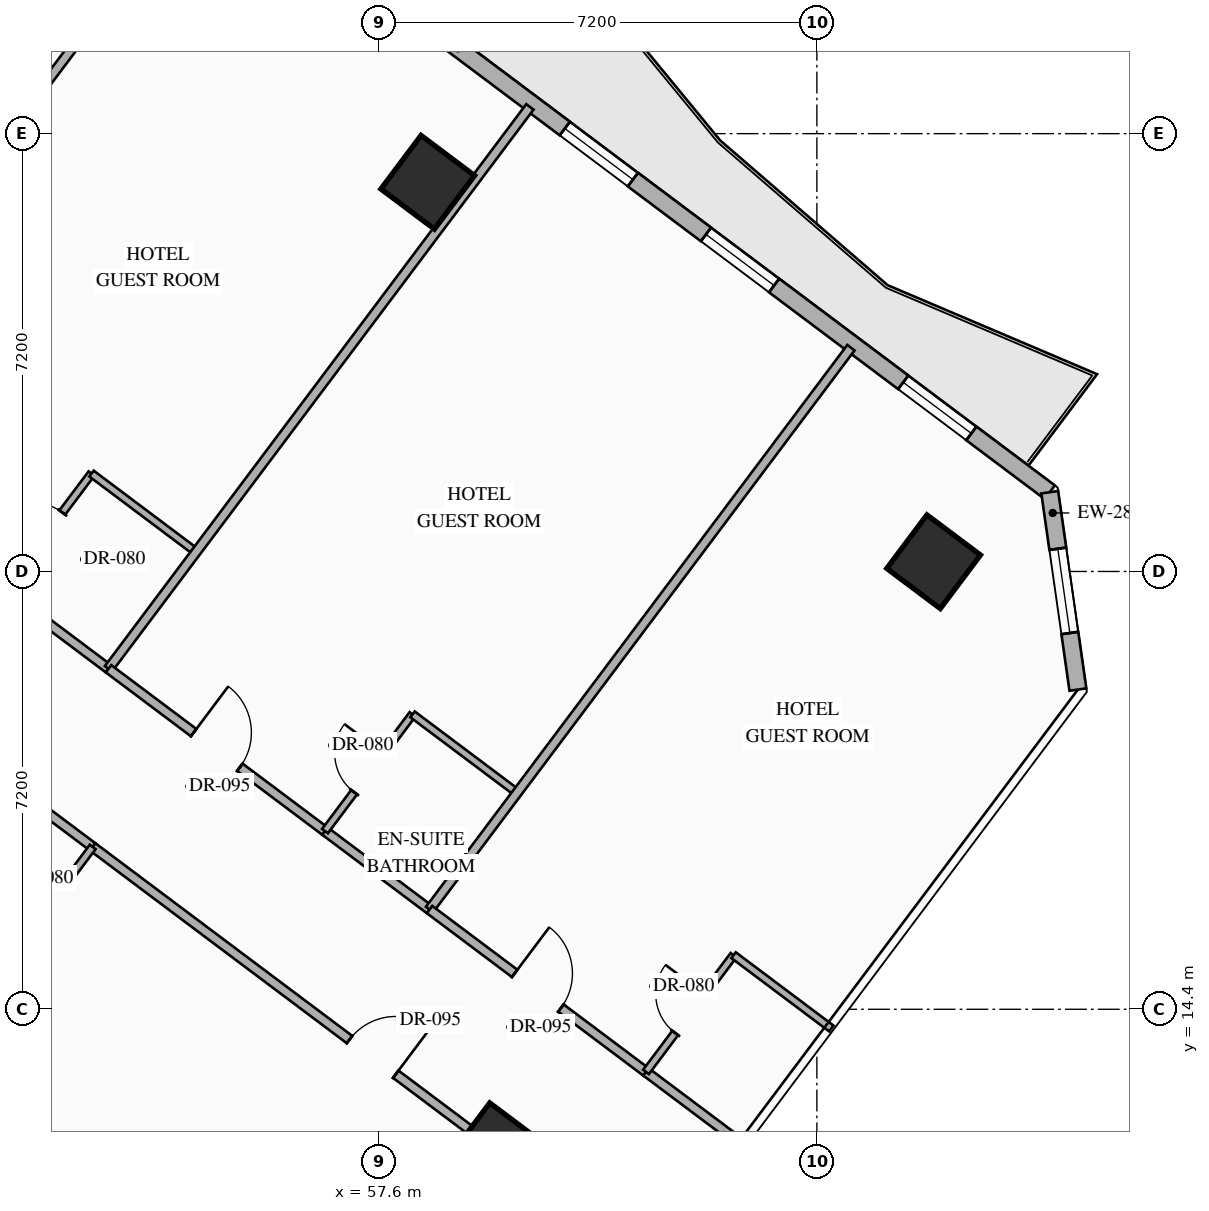
"""IFC4 building model, lengths in metres.
Left out: names, types, materials, properties, quantities, classifications, styles, units other than length and angle.
Written with IfcOpenShell. Run it as: python <this file> out.ifc"""

import sys

from ifc_helpers import new_model, si_unit, direction, frame, frame_2d, origin, origin_2d, place, context, subcontext, project, spatial, rectangle, hollow_rectangle, extrude, element, fill, save


model = new_model("IFC4")
c1 = context("Model", 3, precision=1e-05, world=origin(), true_north=direction((0.0, 1.0)))
c2 = subcontext(c1, "Body", "Model", "MODEL_VIEW")
j1 = project(units=[si_unit("LENGTHUNIT", "METRE"), si_unit("PLANEANGLEUNIT", "RADIAN")], contexts=[c1])
p1 = place(None, origin())
s1 = spatial("IfcSite", under=j1, at=p1, CompositionType="ELEMENT")
p2 = place(p1, origin())
s2 = spatial("IfcBuilding", under=s1, at=p2, CompositionType="ELEMENT")
p3 = place(p2, frame((0.0, 0.0, 53.35)))
s3 = spatial("IfcBuildingStorey", under=s2, at=p3, CompositionType="ELEMENT", Elevation=53.35)
for number, where, z_axis, x_axis in (
    (1, (58.4, 28.0, 0.0), (0.0, 0.0, 1.0), (0.8, -0.6, 0.0)),
    (2, (66.72, 21.76, 0.0), (0.0, 0.0, 1.0), (0.8, -0.6, 0.0)),
):
    element("IfcColumn", number, at=place(p3, frame(where, z_axis=z_axis, x_axis=x_axis)), inside=s3, PredefinedType="COLUMN", context=c2, shape_type="SweptSolid", body=[
        extrude(hollow_rectangle(XDim=1.1, YDim=1.1, WallThickness=0.04, at=origin_2d()), origin(), (0.0, 0.0, 1.0), 3.35),
    ])
p4 = place(p3, frame((59.52, 12.16, 0.0), z_axis=(0.0, 0.0, 1.0), x_axis=(0.799999996291, -0.600000004945, 0.0)))
e3 = element("IfcColumn", 3, at=p4, inside=s3, PredefinedType="COLUMN", context=c2, shape_type="SweptSolid", body=[
    extrude(hollow_rectangle(XDim=1.0, YDim=1.0, WallThickness=0.038, at=origin_2d()), origin(), (0.0, 0.0, 1.0), 3.35),
])
p5 = place(p3, frame((44.86, 40.73, 0.0), z_axis=(0.0, 0.0, 1.0), x_axis=(0.800006902154, -0.599990797017, 0.0)))
e4 = element("IfcWall", 4, at=p5, inside=s3, PredefinedType="STANDARD", context=c2, shape_type="SweptSolid", body=[
    extrude(rectangle(XDim=29.712, YDim=0.28, at=frame_2d((14.856, 0.0))), origin(), (0.0, 0.0, 1.0), 3.13),
])
p6 = place(p5, frame((14.249, 0.0, 0.0)))
e5 = element("IfcOpeningElement", 5, at=p6, cuts=e4, PredefinedType="OPENING", context=c2, shape_type="SweptSolid", body=[
    extrude(rectangle(XDim=1.1, YDim=2.2, at=frame_2d((0.55, 1.1))), frame((0.0, 0.15, 0.0), z_axis=(0.0, -1.0, 0.0), x_axis=(1.0, 0.0, 0.0)), (0.0, 0.0, 1.0), 0.3),
])
p7 = place(p5, frame((1.612, 0.0, 0.85)))
e6 = element("IfcOpeningElement", 6, at=p7, cuts=e4, PredefinedType="OPENING", context=c2, shape_type="SweptSolid", body=[
    extrude(rectangle(XDim=1.4, YDim=1.8, at=frame_2d((0.7, 0.9))), frame((0.0, 0.15, 0.0), z_axis=(0.0, -1.0, 0.0), x_axis=(1.0, 0.0, 0.0)), (0.0, 0.0, 1.0), 0.3),
])
p8 = place(p5, frame((5.667, 0.0, 0.85)))
e7 = element("IfcOpeningElement", 7, at=p8, cuts=e4, PredefinedType="OPENING", context=c2, shape_type="SweptSolid", body=[
    extrude(rectangle(XDim=1.4, YDim=1.8, at=frame_2d((0.7, 0.9))), frame((0.0, 0.15, 0.0), z_axis=(0.0, -1.0, 0.0), x_axis=(1.0, 0.0, 0.0)), (0.0, 0.0, 1.0), 0.3),
])
p9 = place(p5, frame((9.912, 0.0, 0.85)))
e8 = element("IfcOpeningElement", 8, at=p9, cuts=e4, PredefinedType="OPENING", context=c2, shape_type="SweptSolid", body=[
    extrude(rectangle(XDim=1.4, YDim=1.8, at=frame_2d((0.7, 0.9))), frame((0.0, 0.15, 0.0), z_axis=(0.0, -1.0, 0.0), x_axis=(1.0, 0.0, 0.0)), (0.0, 0.0, 1.0), 0.3),
])
p10 = place(p5, frame((19.743, 0.0, 0.85)))
e9 = element("IfcOpeningElement", 9, at=p10, cuts=e4, PredefinedType="OPENING", context=c2, shape_type="SweptSolid", body=[
    extrude(rectangle(XDim=1.4, YDim=1.8, at=frame_2d((0.7, 0.9))), frame((0.0, 0.15, 0.0), z_axis=(0.0, -1.0, 0.0), x_axis=(1.0, 0.0, 0.0)), (0.0, 0.0, 1.0), 0.3),
])
p11 = place(p5, frame((22.645, 0.0, 0.85)))
e10 = element("IfcOpeningElement", 10, at=p11, cuts=e4, PredefinedType="OPENING", context=c2, shape_type="SweptSolid", body=[
    extrude(rectangle(XDim=1.4, YDim=1.8, at=frame_2d((0.7, 0.9))), frame((0.0, 0.15, 0.0), z_axis=(0.0, -1.0, 0.0), x_axis=(1.0, 0.0, 0.0)), (0.0, 0.0, 1.0), 0.3),
])
p12 = place(p5, frame((26.7, 0.0, 0.85)))
e11 = element("IfcOpeningElement", 11, at=p12, cuts=e4, PredefinedType="OPENING", context=c2, shape_type="SweptSolid", body=[
    extrude(rectangle(XDim=1.4, YDim=1.8, at=frame_2d((0.7, 0.9))), frame((0.0, 0.15, 0.0), z_axis=(0.0, -1.0, 0.0), x_axis=(1.0, 0.0, 0.0)), (0.0, 0.0, 1.0), 0.3),
])
p13 = place(p3, frame((68.63, 22.903, 0.0), z_axis=(0.0, 0.0, 1.0), x_axis=(0.141285803956, -0.989968848803, 0.0)))
e12 = element("IfcWall", 12, at=p13, inside=s3, PredefinedType="STANDARD", context=c2, shape_type="SweptSolid", body=[
    extrude(rectangle(XDim=3.278, YDim=0.28, at=frame_2d((1.639, 0.0))), origin(), (0.0, 0.0, 1.0), 3.13),
])
p14 = place(p13, frame((0.939, 0.0, 0.85)))
e13 = element("IfcOpeningElement", 13, at=p14, cuts=e12, PredefinedType="OPENING", context=c2, shape_type="SweptSolid", body=[
    extrude(rectangle(XDim=1.4, YDim=1.8, at=frame_2d((0.7, 0.9))), frame((0.0, 0.15, 0.0), z_axis=(0.0, -1.0, 0.0), x_axis=(1.0, 0.0, 0.0)), (0.0, 0.0, 1.0), 0.3),
])
p15 = place(p3, frame((53.318, 2.487, 0.0), z_axis=(0.0, 0.0, 1.0), x_axis=(-0.800004174678, 0.599994433723, 0.0)))
e14 = element("IfcWall", 14, at=p15, inside=s3, PredefinedType="STANDARD", context=c2, shape_type="SweptSolid", body=[
    extrude(rectangle(XDim=35.089, YDim=0.28, at=frame_2d((17.544, 0.0))), origin(), (0.0, 0.0, 1.0), 3.13),
])
p16 = place(p15, frame((1.931, 0.0, 0.85)))
e15 = element("IfcOpeningElement", 15, at=p16, cuts=e14, PredefinedType="OPENING", context=c2, shape_type="SweptSolid", body=[
    extrude(rectangle(XDim=1.4, YDim=1.8, at=frame_2d((0.7, 0.9))), frame((0.0, 0.15, 0.0), z_axis=(0.0, -1.0, 0.0), x_axis=(1.0, 0.0, 0.0)), (0.0, 0.0, 1.0), 0.3),
])
p17 = place(p15, frame((6.819, 0.0, 0.85)))
e16 = element("IfcOpeningElement", 16, at=p17, cuts=e14, PredefinedType="OPENING", context=c2, shape_type="SweptSolid", body=[
    extrude(rectangle(XDim=1.4, YDim=1.8, at=frame_2d((0.7, 0.9))), frame((0.0, 0.15, 0.0), z_axis=(0.0, -1.0, 0.0), x_axis=(1.0, 0.0, 0.0)), (0.0, 0.0, 1.0), 0.3),
])
p18 = place(p15, frame((11.832, 0.0, 0.85)))
e17 = element("IfcOpeningElement", 17, at=p18, cuts=e14, PredefinedType="OPENING", context=c2, shape_type="SweptSolid", body=[
    extrude(rectangle(XDim=1.4, YDim=1.8, at=frame_2d((0.7, 0.9))), frame((0.0, 0.15, 0.0), z_axis=(0.0, -1.0, 0.0), x_axis=(1.0, 0.0, 0.0)), (0.0, 0.0, 1.0), 0.3),
])
p19 = place(p15, frame((17.647, 0.0, 0.85)))
e18 = element("IfcOpeningElement", 18, at=p19, cuts=e14, PredefinedType="OPENING", context=c2, shape_type="SweptSolid", body=[
    extrude(rectangle(XDim=1.4, YDim=1.8, at=frame_2d((0.7, 0.9))), frame((0.0, 0.15, 0.0), z_axis=(0.0, -1.0, 0.0), x_axis=(1.0, 0.0, 0.0)), (0.0, 0.0, 1.0), 0.3),
])
p20 = place(p15, frame((21.857, 0.0, 0.85)))
e19 = element("IfcOpeningElement", 19, at=p20, cuts=e14, PredefinedType="OPENING", context=c2, shape_type="SweptSolid", body=[
    extrude(rectangle(XDim=1.4, YDim=1.8, at=frame_2d((0.7, 0.9))), frame((0.0, 0.15, 0.0), z_axis=(0.0, -1.0, 0.0), x_axis=(1.0, 0.0, 0.0)), (0.0, 0.0, 1.0), 0.3),
])
p21 = place(p15, frame((26.87, 0.0, 0.85)))
e20 = element("IfcOpeningElement", 20, at=p21, cuts=e14, PredefinedType="OPENING", context=c2, shape_type="SweptSolid", body=[
    extrude(rectangle(XDim=1.4, YDim=1.8, at=frame_2d((0.7, 0.9))), frame((0.0, 0.15, 0.0), z_axis=(0.0, -1.0, 0.0), x_axis=(1.0, 0.0, 0.0)), (0.0, 0.0, 1.0), 0.3),
])
p22 = place(p15, frame((31.757, 0.0, 0.85)))
e21 = element("IfcOpeningElement", 21, at=p22, cuts=e14, PredefinedType="OPENING", context=c2, shape_type="SweptSolid", body=[
    extrude(rectangle(XDim=1.4, YDim=1.8, at=frame_2d((0.7, 0.9))), frame((0.0, 0.15, 0.0), z_axis=(0.0, -1.0, 0.0), x_axis=(1.0, 0.0, 0.0)), (0.0, 0.0, 1.0), 0.3),
])
p23 = place(p3, frame((51.43, 21.29, 0.0), z_axis=(0.0, 0.0, 1.0), x_axis=(0.79998637334, -0.60001816845, 0.0)))
e22 = element("IfcWall", 22, at=p23, inside=s3, PredefinedType="PARTITIONING", context=c2, shape_type="SweptSolid", body=[
    extrude(rectangle(XDim=2.15, YDim=0.15, at=frame_2d((1.075, 0.0))), origin(), (0.0, 0.0, 1.0), 2.775),
])
p24 = place(p3, frame((51.43, 21.29, 0.0), z_axis=(0.0, 0.0, 1.0), x_axis=(0.600065100855, 0.79995117022, 0.0)))
e23 = element("IfcWall", 23, at=p24, inside=s3, PredefinedType="PARTITIONING", context=c2, shape_type="SweptSolid", body=[
    extrude(rectangle(XDim=2.4, YDim=0.12, at=frame_2d((1.2, 0.0))), origin(), (0.0, 0.0, 1.0), 3.13),
])
p25 = place(p24, frame((0.8, 0.0, 0.0)))
e24 = element("IfcOpeningElement", 24, at=p25, cuts=e23, PredefinedType="OPENING", context=c2, shape_type="SweptSolid", body=[
    extrude(rectangle(XDim=0.8, YDim=2.06, at=frame_2d((0.4, 1.03))), frame((0.0, 0.07, 0.0), z_axis=(0.0, -1.0, 0.0), x_axis=(1.0, 0.0, 0.0)), (0.0, 0.0, 1.0), 0.14),
])
p26 = place(p3, frame((52.87, 23.21, 0.0), z_axis=(0.0, 0.0, 1.0), x_axis=(0.79998637334, -0.60001816845, 0.0)))
e25 = element("IfcWall", 25, at=p26, inside=s3, PredefinedType="PARTITIONING", context=c2, shape_type="SweptSolid", body=[
    extrude(rectangle(XDim=2.15, YDim=0.12, at=frame_2d((1.075, 0.0))), origin(), (0.0, 0.0, 1.0), 3.13),
])
for number, where, z_axis, x_axis in (
    (26, (47.87, 23.96, 0.0), (0.0, 0.0, 1.0), (0.6, 0.8, 0.0)),
    (27, (53.15, 20.0, 0.0), (0.0, 0.0, 1.0), (0.6, 0.8, 0.0)),
):
    element("IfcWall", number, at=place(p3, frame(where, z_axis=z_axis, x_axis=x_axis)), inside=s3, PredefinedType="PARTITIONING", context=c2, shape_type="SweptSolid", body=[
        extrude(rectangle(XDim=11.55, YDim=0.15, at=frame_2d((5.775, 0.0))), origin(), (0.0, 0.0, 1.0), 3.13),
    ])
p27 = place(p3, frame((53.15, 20.0, 0.0), z_axis=(0.0, 0.0, 1.0), x_axis=(0.800013166942, -0.599982443676, 0.0)))
e28 = element("IfcWall", 28, at=p27, inside=s3, PredefinedType="PARTITIONING", context=c2, shape_type="SweptSolid", body=[
    extrude(rectangle(XDim=4.45, YDim=0.15, at=frame_2d((2.225, 0.0))), origin(), (0.0, 0.0, 1.0), 2.775),
])
p28 = place(p27, frame((1.75, 0.0, 0.0)))
e29 = element("IfcOpeningElement", 29, at=p28, cuts=e28, PredefinedType="OPENING", context=c2, shape_type="SweptSolid", body=[
    extrude(rectangle(XDim=0.95, YDim=2.15, at=frame_2d((0.475, 1.075))), frame((0.0, 0.085, 0.0), z_axis=(0.0, -1.0, 0.0), x_axis=(1.0, 0.0, 0.0)), (0.0, 0.0, 1.0), 0.17),
])
p29 = place(p3, frame((56.71, 17.33, 0.0), z_axis=(0.0, 0.0, 1.0), x_axis=(0.79998637334, -0.60001816845, 0.0)))
e30 = element("IfcWall", 30, at=p29, inside=s3, PredefinedType="PARTITIONING", context=c2, shape_type="SweptSolid", body=[
    extrude(rectangle(XDim=2.15, YDim=0.15, at=frame_2d((1.075, 0.0))), origin(), (0.0, 0.0, 1.0), 2.775),
])
p30 = place(p3, frame((56.71, 17.33, 0.0), z_axis=(0.0, 0.0, 1.0), x_axis=(0.6, 0.8, 0.0)))
e31 = element("IfcWall", 31, at=p30, inside=s3, PredefinedType="PARTITIONING", context=c2, shape_type="SweptSolid", body=[
    extrude(rectangle(XDim=2.4, YDim=0.12, at=frame_2d((1.2, 0.0))), origin(), (0.0, 0.0, 1.0), 3.13),
])
p31 = place(p30, frame((0.8, 0.0, 0.0)))
e32 = element("IfcOpeningElement", 32, at=p31, cuts=e31, PredefinedType="OPENING", context=c2, shape_type="SweptSolid", body=[
    extrude(rectangle(XDim=0.8, YDim=2.06, at=frame_2d((0.4, 1.03))), frame((0.0, 0.07, 0.0), z_axis=(0.0, -1.0, 0.0), x_axis=(1.0, 0.0, 0.0)), (0.0, 0.0, 1.0), 0.14),
])
p32 = place(p3, frame((58.15, 19.25, 0.0), z_axis=(0.0, 0.0, 1.0), x_axis=(0.800027249606, -0.599963665473, 0.0)))
e33 = element("IfcWall", 33, at=p32, inside=s3, PredefinedType="PARTITIONING", context=c2, shape_type="SweptSolid", body=[
    extrude(rectangle(XDim=2.15, YDim=0.12, at=frame_2d((1.075, 0.0))), origin(), (0.0, 0.0, 1.0), 3.13),
])
p33 = place(p3, frame((58.43, 16.04, 0.0), z_axis=(0.0, 0.0, 1.0), x_axis=(0.60001014597, 0.799992390422, 0.0)))
e34 = element("IfcWall", 34, at=p33, inside=s3, PredefinedType="PARTITIONING", context=c2, shape_type="SweptSolid", body=[
    extrude(rectangle(XDim=11.55, YDim=0.15, at=frame_2d((5.775, 0.0))), origin(), (0.0, 0.0, 1.0), 3.13),
])
p34 = place(p3, frame((58.43, 16.04, 0.0), z_axis=(0.0, 0.0, 1.0), x_axis=(0.800013166942, -0.599982443676, 0.0)))
e35 = element("IfcWall", 35, at=p34, inside=s3, PredefinedType="PARTITIONING", context=c2, shape_type="SweptSolid", body=[
    extrude(rectangle(XDim=4.45, YDim=0.15, at=frame_2d((2.225, 0.0))), origin(), (0.0, 0.0, 1.0), 2.775),
])
p35 = place(p34, frame((1.75, 0.0, 0.0)))
e36 = element("IfcOpeningElement", 36, at=p35, cuts=e35, PredefinedType="OPENING", context=c2, shape_type="SweptSolid", body=[
    extrude(rectangle(XDim=0.95, YDim=2.15, at=frame_2d((0.475, 1.075))), frame((0.0, 0.085, 0.0), z_axis=(0.0, -1.0, 0.0), x_axis=(1.0, 0.0, 0.0)), (0.0, 0.0, 1.0), 0.17),
])
p36 = place(p3, frame((61.99, 13.37, 0.0), z_axis=(0.0, 0.0, 1.0), x_axis=(0.79997084737, -0.600038868206, 0.0)))
e37 = element("IfcWall", 37, at=p36, inside=s3, PredefinedType="PARTITIONING", context=c2, shape_type="SweptSolid", body=[
    extrude(rectangle(XDim=2.01, YDim=0.15, at=frame_2d((1.005, 0.0))), origin(), (0.0, 0.0, 1.0), 3.13),
])
p37 = place(p3, frame((61.99, 13.37, 0.0), z_axis=(0.0, 0.0, 1.0), x_axis=(0.6, 0.8, 0.0)))
e38 = element("IfcWall", 38, at=p37, inside=s3, PredefinedType="PARTITIONING", context=c2, shape_type="SweptSolid", body=[
    extrude(rectangle(XDim=2.4, YDim=0.12, at=frame_2d((1.2, 0.0))), origin(), (0.0, 0.0, 1.0), 3.13),
])
p38 = place(p37, frame((0.8, 0.0, 0.0)))
e39 = element("IfcOpeningElement", 39, at=p38, cuts=e38, PredefinedType="OPENING", context=c2, shape_type="SweptSolid", body=[
    extrude(rectangle(XDim=0.8, YDim=2.06, at=frame_2d((0.4, 1.03))), frame((0.0, 0.07, 0.0), z_axis=(0.0, -1.0, 0.0), x_axis=(1.0, 0.0, 0.0)), (0.0, 0.0, 1.0), 0.14),
])
p39 = place(p3, frame((63.43, 15.29, 0.0), z_axis=(0.0, 0.0, 1.0), x_axis=(0.800014574191, -0.599980567254, 0.0)))
e40 = element("IfcWall", 40, at=p39, inside=s3, PredefinedType="PARTITIONING", context=c2, shape_type="SweptSolid", body=[
    extrude(rectangle(XDim=2.01, YDim=0.12, at=frame_2d((1.005, 0.0))), origin(), (0.0, 0.0, 1.0), 3.13),
])
p40 = place(p3, frame((51.17, 18.36, 0.0), z_axis=(0.0, 0.0, 1.0), x_axis=(0.79998637334, -0.60001816845, 0.0)))
e41 = element("IfcWall", 41, at=p40, inside=s3, PredefinedType="PARTITIONING", context=c2, shape_type="SweptSolid", body=[
    extrude(rectangle(XDim=2.15, YDim=0.15, at=frame_2d((1.075, 0.0))), origin(), (0.0, 0.0, 1.0), 2.425),
])
p41 = place(p3, frame((52.89, 17.07, 0.0), z_axis=(0.0, 0.0, 1.0), x_axis=(0.8, -0.6, 0.0)))
e42 = element("IfcWall", 42, at=p41, inside=s3, PredefinedType="PARTITIONING", context=c2, shape_type="SweptSolid", body=[
    extrude(rectangle(XDim=11.51, YDim=0.15, at=frame_2d((5.755, 0.0))), origin(), (0.0, 0.0, 1.0), 2.425),
])
p42 = place(p41, frame((5.28, 0.0, 0.0)))
e43 = element("IfcOpeningElement", 43, at=p42, cuts=e42, PredefinedType="OPENING", context=c2, shape_type="SweptSolid", body=[
    extrude(rectangle(XDim=0.95, YDim=2.15, at=frame_2d((0.475, 1.075))), frame((0.0, 0.085, 0.0), z_axis=(0.0, -1.0, 0.0), x_axis=(1.0, 0.0, 0.0)), (0.0, 0.0, 1.0), 0.17),
])
p43 = place(p3, frame((51.45, 15.15, 0.0), z_axis=(0.0, 0.0, 1.0), x_axis=(0.599951172744, 0.800036618114, 0.0)))
e44 = element("IfcWall", 44, at=p43, inside=s3, PredefinedType="PARTITIONING", context=c2, shape_type="SweptSolid", body=[
    extrude(rectangle(XDim=2.4, YDim=0.12, at=frame_2d((1.2, 0.0))), origin(), (0.0, 0.0, 1.0), 3.13),
])
p44 = place(p43, frame((0.8, 0.0, 0.0)))
e45 = element("IfcOpeningElement", 45, at=p44, cuts=e44, PredefinedType="OPENING", context=c2, shape_type="SweptSolid", body=[
    extrude(rectangle(XDim=0.8, YDim=2.06, at=frame_2d((0.4, 1.03))), frame((0.0, 0.07, 0.0), z_axis=(0.0, -1.0, 0.0), x_axis=(1.0, 0.0, 0.0)), (0.0, 0.0, 1.0), 0.14),
])
p45 = place(p10, origin())
e46 = element("IfcWindow", 46, at=p45, inside=s3, PartitioningType="SINGLE_PANEL", PredefinedType="WINDOW", context=c2, shape_type="SweptSolid", body=[
    extrude(rectangle(XDim=1.4, YDim=1.8, at=frame_2d((0.7, 0.9))), frame((0.0, 0.03, 0.0), z_axis=(0.0, -1.0, 0.0), x_axis=(1.0, 0.0, 0.0)), (0.0, 0.0, 1.0), 0.06),
])
fill(e9, e46)
p46 = place(p11, origin())
e47 = element("IfcWindow", 47, at=p46, inside=s3, PartitioningType="SINGLE_PANEL", PredefinedType="WINDOW", context=c2, shape_type="SweptSolid", body=[
    extrude(rectangle(XDim=1.4, YDim=1.8, at=frame_2d((0.7, 0.9))), frame((0.0, 0.03, 0.0), z_axis=(0.0, -1.0, 0.0), x_axis=(1.0, 0.0, 0.0)), (0.0, 0.0, 1.0), 0.06),
])
fill(e10, e47)
p47 = place(p12, origin())
e48 = element("IfcWindow", 48, at=p47, inside=s3, PartitioningType="SINGLE_PANEL", PredefinedType="WINDOW", context=c2, shape_type="SweptSolid", body=[
    extrude(rectangle(XDim=1.4, YDim=1.8, at=frame_2d((0.7, 0.9))), frame((0.0, 0.03, 0.0), z_axis=(0.0, -1.0, 0.0), x_axis=(1.0, 0.0, 0.0)), (0.0, 0.0, 1.0), 0.06),
])
fill(e11, e48)
p48 = place(p14, origin())
e49 = element("IfcWindow", 49, at=p48, inside=s3, PartitioningType="SINGLE_PANEL", PredefinedType="WINDOW", context=c2, shape_type="SweptSolid", body=[
    extrude(rectangle(XDim=1.4, YDim=1.8, at=frame_2d((0.7, 0.9))), frame((0.0, 0.03, 0.0), z_axis=(0.0, -1.0, 0.0), x_axis=(1.0, 0.0, 0.0)), (0.0, 0.0, 1.0), 0.06),
])
fill(e13, e49)
p49 = place(p25, origin())
e50 = element("IfcDoor", 50, at=p49, inside=s3, OperationType="SINGLE_SWING_LEFT", PredefinedType="DOOR", context=c2, shape_type="SweptSolid", body=[
    extrude(rectangle(XDim=0.8, YDim=2.06, at=frame_2d((0.4, 1.03))), frame((0.0, 0.025, 0.0), z_axis=(0.0, -1.0, 0.0), x_axis=(1.0, 0.0, 0.0)), (0.0, 0.0, 1.0), 0.05),
])
fill(e24, e50)
p50 = place(p28, origin())
e51 = element("IfcDoor", 51, at=p50, inside=s3, OperationType="SINGLE_SWING_LEFT", PredefinedType="DOOR", context=c2, shape_type="SweptSolid", body=[
    extrude(rectangle(XDim=0.95, YDim=2.15, at=frame_2d((0.475, 1.075))), frame((0.0, 0.025, 0.0), z_axis=(0.0, -1.0, 0.0), x_axis=(1.0, 0.0, 0.0)), (0.0, 0.0, 1.0), 0.05),
])
fill(e29, e51)
p51 = place(p31, origin())
e52 = element("IfcDoor", 52, at=p51, inside=s3, OperationType="SINGLE_SWING_RIGHT", PredefinedType="DOOR", context=c2, shape_type="SweptSolid", body=[
    extrude(rectangle(XDim=0.8, YDim=2.06, at=frame_2d((0.4, 1.03))), frame((0.0, 0.025, 0.0), z_axis=(0.0, -1.0, 0.0), x_axis=(1.0, 0.0, 0.0)), (0.0, 0.0, 1.0), 0.05),
])
fill(e32, e52)
p52 = place(p35, origin())
e53 = element("IfcDoor", 53, at=p52, inside=s3, OperationType="SINGLE_SWING_LEFT", PredefinedType="DOOR", context=c2, shape_type="SweptSolid", body=[
    extrude(rectangle(XDim=0.95, YDim=2.15, at=frame_2d((0.475, 1.075))), frame((0.0, 0.025, 0.0), z_axis=(0.0, -1.0, 0.0), x_axis=(1.0, 0.0, 0.0)), (0.0, 0.0, 1.0), 0.05),
])
fill(e36, e53)
p53 = place(p38, origin())
e54 = element("IfcDoor", 54, at=p53, inside=s3, OperationType="SINGLE_SWING_RIGHT", PredefinedType="DOOR", context=c2, shape_type="SweptSolid", body=[
    extrude(rectangle(XDim=0.8, YDim=2.06, at=frame_2d((0.4, 1.03))), frame((0.0, 0.025, 0.0), z_axis=(0.0, -1.0, 0.0), x_axis=(1.0, 0.0, 0.0)), (0.0, 0.0, 1.0), 0.05),
])
fill(e39, e54)
p54 = place(p42, origin())
e55 = element("IfcDoor", 55, at=p54, inside=s3, OperationType="SINGLE_SWING_RIGHT", PredefinedType="DOOR", context=c2, shape_type="SweptSolid", body=[
    extrude(rectangle(XDim=0.95, YDim=2.15, at=frame_2d((0.475, 1.075))), frame((0.0, 0.025, 0.0), z_axis=(0.0, -1.0, 0.0), x_axis=(1.0, 0.0, 0.0)), (0.0, 0.0, 1.0), 0.05),
])
fill(e43, e55)
p55 = place(p44, origin())
e56 = element("IfcDoor", 56, at=p55, inside=s3, OperationType="SINGLE_SWING_RIGHT", PredefinedType="DOOR", context=c2, shape_type="SweptSolid", body=[
    extrude(rectangle(XDim=0.8, YDim=2.06, at=frame_2d((0.4, 1.03))), frame((0.0, 0.025, 0.0), z_axis=(0.0, -1.0, 0.0), x_axis=(1.0, 0.0, 0.0)), (0.0, 0.0, 1.0), 0.05),
])
fill(e45, e56)
save(model, sys.argv[1])
